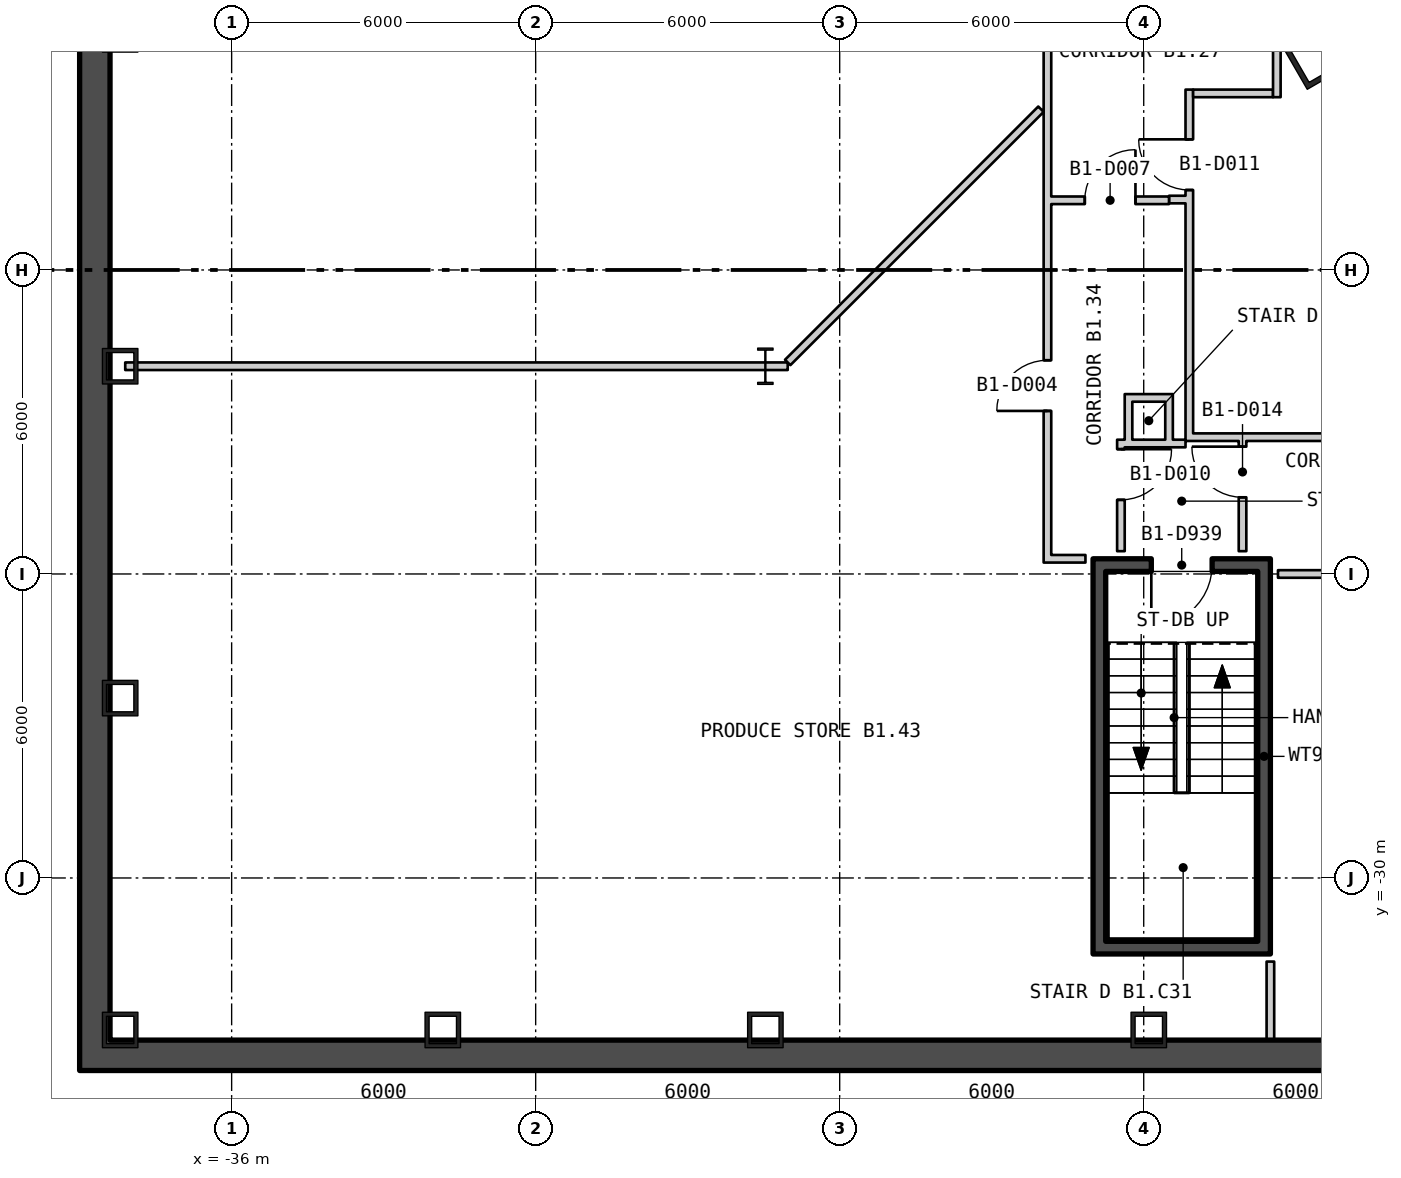
"""IFC4 building model, lengths in metres.
Left out: names, types, materials, properties, quantities, classifications, styles, units other than length and angle.
Written with IfcOpenShell. Run it as: python <this file> out.ifc"""

import sys

from ifc_helpers import new_model, si_unit, direction, frame, frame_2d, origin, origin_2d, place, context, subcontext, project, spatial, rectangle, hollow_rectangle, i_section, extrude, element, fill, save


model = new_model("IFC4")
c1 = context("Model", 3, precision=1e-05, world=origin(), true_north=direction((0.0, 1.0)))
c2 = subcontext(c1, "Body", "Model", "MODEL_VIEW")
j1 = project(units=[si_unit("LENGTHUNIT", "METRE"), si_unit("PLANEANGLEUNIT", "RADIAN")], contexts=[c1])
p1 = place(None, origin())
s1 = spatial("IfcSite", under=j1, at=p1, CompositionType="ELEMENT")
p2 = place(p1, origin())
s2 = spatial("IfcBuilding", under=s1, at=p2, CompositionType="ELEMENT")
p3 = place(p2, frame((0.0, 0.0, -5.7)))
s3 = spatial("IfcBuildingStorey", under=s2, at=p3, CompositionType="ELEMENT", Elevation=-5.7)
p4 = place(p3, frame((-14.553, -13.615, 0.0), z_axis=(0.0, 0.0, 1.0), x_axis=(0.5, -0.866025403784, 0.0)))
e1 = element("IfcColumn", 1, at=p4, inside=s3, PredefinedType="COLUMN", context=c2, shape_type="SweptSolid", body=[
    extrude(hollow_rectangle(XDim=1.2, YDim=1.2, WallThickness=0.1, at=origin_2d()), origin(), (0.0, 0.0, 1.0), 5.7),
])
for number, where, z_axis, x_axis in (
    (2, (-38.2, -19.9, 0.0), (0.0, 0.0, 1.0), (0.0, -1.0, 0.0)),
    (3, (-38.2, -26.45, 0.0), (0.0, 0.0, 1.0), (0.0, -1.0, 0.0)),
    (4, (-38.2, -33.0, 0.0), (0.0, 0.0, 1.0), (1.0, 0.0, 0.0)),
    (5, (-31.833, -33.0, 0.0), (0.0, 0.0, 1.0), (1.0, 0.0, 0.0)),
    (6, (-25.467, -33.0, 0.0), (0.0, 0.0, 1.0), (1.0, 0.0, 0.0)),
    (7, (-17.9, -33.0, 0.0), (0.0, 0.0, 1.0), (1.0, 0.0, 0.0)),
):
    element("IfcColumn", number, at=place(p3, frame(where, z_axis=z_axis, x_axis=x_axis)), inside=s3, PredefinedType="COLUMN", context=c2, shape_type="SweptSolid", body=[
        extrude(hollow_rectangle(XDim=0.7, YDim=0.7, WallThickness=0.08, at=origin_2d()), origin(), (0.0, 0.0, 1.0), 5.7),
    ])
p5 = place(p3, frame((-25.467, -19.9, 0.0), z_axis=(0.0, 0.0, 1.0), x_axis=(1.0, 0.0, 0.0)))
e8 = element("IfcColumn", 8, at=p5, inside=s3, PredefinedType="COLUMN", context=c2, shape_type="SweptSolid", body=[
    extrude(i_section(OverallWidth=0.304, OverallDepth=0.716, WebThickness=0.021, FlangeThickness=0.04, at=origin_2d()), origin(), (0.0, 0.0, 1.0), 5.7),
])
p6 = place(p3, frame((-39.0, -33.5, -0.4), z_axis=(0.0, 0.0, 1.0), x_axis=(1.0, 0.0, 0.0)))
e9 = element("IfcWall", 9, at=p6, inside=s3, PredefinedType="STANDARD", context=c2, shape_type="SweptSolid", body=[
    extrude(rectangle(XDim=78.0, YDim=0.6, at=frame_2d((39.0, 0.0))), origin(), (0.0, 0.0, 1.0), 5.7),
])
p7 = place(p3, frame((-38.7, -33.2, -0.4), z_axis=(0.0, 0.0, 1.0), x_axis=(0.0, 1.0, 0.0)))
e10 = element("IfcWall", 10, at=p7, inside=s3, PredefinedType="STANDARD", context=c2, shape_type="SweptSolid", body=[
    extrude(rectangle(XDim=52.8, YDim=0.6, at=frame_2d((26.4, 0.0))), origin(), (0.0, 0.0, 1.0), 5.7),
])
for number, where, z_axis, x_axis in (
    (11, (-18.875, -31.25, 0.0), (0.0, 0.0, 1.0), (0.0, 1.0, 0.0)),
    (12, (-15.625, -31.25, 0.0), (0.0, 0.0, 1.0), (0.0, 1.0, 0.0)),
):
    element("IfcWall", number, at=place(p3, frame(where, z_axis=z_axis, x_axis=x_axis)), inside=s3, PredefinedType="SHEAR", context=c2, shape_type="SweptSolid", body=[
        extrude(rectangle(XDim=7.3, YDim=0.25, at=frame_2d((3.65, 0.0))), origin(), (0.0, 0.0, 1.0), 5.25),
    ])
p8 = place(p3, frame((-19.0, -31.375, 0.0), z_axis=(0.0, 0.0, 1.0), x_axis=(1.0, 0.0, 0.0)))
e13 = element("IfcWall", 13, at=p8, inside=s3, PredefinedType="SHEAR", context=c2, shape_type="SweptSolid", body=[
    extrude(rectangle(XDim=3.5, YDim=0.25, at=frame_2d((1.75, 0.0))), origin(), (0.0, 0.0, 1.0), 5.25),
])
p9 = place(p3, frame((-19.0, -23.825, 0.0), z_axis=(0.0, 0.0, 1.0), x_axis=(1.0, 0.0, 0.0)))
e14 = element("IfcWall", 14, at=p9, inside=s3, PredefinedType="SHEAR", context=c2, shape_type="SweptSolid", body=[
    extrude(rectangle(XDim=3.5, YDim=0.25, at=frame_2d((1.75, 0.0))), origin(), (0.0, 0.0, 1.0), 5.25),
])
p10 = place(p9, frame((1.15, 0.0, 0.0)))
e15 = element("IfcOpeningElement", 15, at=p10, cuts=e14, PredefinedType="OPENING", context=c2, shape_type="SweptSolid", body=[
    extrude(rectangle(XDim=1.2, YDim=2.1, at=frame_2d((0.6, 1.05))), frame((0.0, 0.135, 0.0), z_axis=(0.0, -1.0, 0.0), x_axis=(1.0, 0.0, 0.0)), (0.0, 0.0, 1.0), 0.27),
])
p11 = place(p3, frame((-38.1, -19.9, 0.0), z_axis=(0.0, 0.0, 1.0), x_axis=(1.0, 0.0, 0.0)))
e16 = element("IfcWall", 16, at=p11, inside=s3, PredefinedType="PARTITIONING", context=c2, shape_type="SweptSolid", body=[
    extrude(rectangle(XDim=13.074, YDim=0.15, at=frame_2d((6.537, 0.0))), origin(), (0.0, 0.0, 1.0), 5.25),
])
p12 = place(p3, frame((-25.026, -19.825, 0.0), z_axis=(0.0, 0.0, 1.0), x_axis=(0.707106781187, 0.707106781187, 0.0)))
e17 = element("IfcWall", 17, at=p12, inside=s3, PredefinedType="PARTITIONING", context=c2, shape_type="SweptSolid", body=[
    extrude(rectangle(XDim=7.068, YDim=0.15, at=frame_2d((3.534, 0.0))), origin(), (0.0, 0.0, 1.0), 5.25),
])
p13 = place(p3, frame((-19.9, -23.775, 0.0), z_axis=(0.0, 0.0, 1.0), x_axis=(0.0, 1.0, 0.0)))
e18 = element("IfcWall", 18, at=p13, inside=s3, PredefinedType="PARTITIONING", context=c2, shape_type="SweptSolid", body=[
    extrude(rectangle(XDim=16.875, YDim=0.15, at=frame_2d((8.438, 0.0))), origin(), (0.0, 0.0, 1.0), 5.25),
])
p14 = place(p13, frame((2.993, 0.0, 0.0)))
e19 = element("IfcOpeningElement", 19, at=p14, cuts=e18, PredefinedType="OPENING", context=c2, shape_type="SweptSolid", body=[
    extrude(rectangle(XDim=1.0, YDim=2.1, at=frame_2d((0.5, 1.05))), frame((0.0, 0.085, 0.0), z_axis=(0.0, -1.0, 0.0), x_axis=(1.0, 0.0, 0.0)), (0.0, 0.0, 1.0), 0.17),
])
p15 = place(p13, frame((12.35, 0.0, 0.0)))
e20 = element("IfcOpeningElement", 20, at=p15, cuts=e18, PredefinedType="OPENING", context=c2, shape_type="SweptSolid", body=[
    extrude(rectangle(XDim=1.0, YDim=2.1, at=frame_2d((0.5, 1.05))), frame((0.0, 0.085, 0.0), z_axis=(0.0, -1.0, 0.0), x_axis=(1.0, 0.0, 0.0)), (0.0, 0.0, 1.0), 0.17),
])
p16 = place(p3, frame((-19.825, -23.7, 0.0), z_axis=(0.0, 0.0, 1.0), x_axis=(1.0, 0.0, 0.0)))
e21 = element("IfcWall", 21, at=p16, inside=s3, PredefinedType="PARTITIONING", context=c2, shape_type="SweptSolid", body=[
    extrude(rectangle(XDim=0.675, YDim=0.15, at=frame_2d((0.338, 0.0))), origin(), (0.0, 0.0, 1.0), 5.25),
])
p17 = place(p3, frame((-19.825, -16.625, 0.0), z_axis=(0.0, 0.0, 1.0), x_axis=(1.0, 0.0, 0.0)))
e22 = element("IfcWall", 22, at=p17, inside=s3, PredefinedType="PARTITIONING", context=c2, shape_type="SweptSolid", body=[
    extrude(rectangle(XDim=2.324, YDim=0.15, at=frame_2d((1.162, 0.0))), origin(), (0.0, 0.0, 1.0), 5.25),
])
p18 = place(p17, frame((0.662, 0.0, 0.0)))
e23 = element("IfcOpeningElement", 23, at=p18, cuts=e22, PredefinedType="OPENING", context=c2, shape_type="SweptSolid", body=[
    extrude(rectangle(XDim=1.0, YDim=2.1, at=frame_2d((0.5, 1.05))), frame((0.0, 0.085, 0.0), z_axis=(0.0, -1.0, 0.0), x_axis=(1.0, 0.0, 0.0)), (0.0, 0.0, 1.0), 0.17),
])
p19 = place(p3, frame((-18.45, -23.55, 0.0), z_axis=(0.0, 0.0, 1.0), x_axis=(0.0, 1.0, 0.0)))
e24 = element("IfcWall", 24, at=p19, inside=s3, PredefinedType="PARTITIONING", context=c2, shape_type="SweptSolid", body=[
    extrude(rectangle(XDim=2.2, YDim=0.15, at=frame_2d((1.1, 0.0))), origin(), (0.0, 0.0, 1.0), 5.25),
])
p20 = place(p19, frame((1.013, 0.0, 0.0)))
e25 = element("IfcOpeningElement", 25, at=p20, cuts=e24, PredefinedType="OPENING", context=c2, shape_type="SweptSolid", body=[
    extrude(rectangle(XDim=1.0, YDim=2.1, at=frame_2d((0.5, 1.05))), frame((0.0, 0.085, 0.0), z_axis=(0.0, -1.0, 0.0), x_axis=(1.0, 0.0, 0.0)), (0.0, 0.0, 1.0), 0.17),
])
p21 = place(p3, frame((-18.3, -21.5, 0.0), z_axis=(0.0, 0.0, 1.0), x_axis=(0.0, 1.0, 0.0)))
e26 = element("IfcWall", 26, at=p21, inside=s3, PredefinedType="PARTITIONING", context=c2, shape_type="SweptSolid", body=[
    extrude(rectangle(XDim=1.05, YDim=0.15, at=frame_2d((0.525, 0.0))), origin(), (0.0, 0.0, 1.0), 5.25),
])
for number, where, z_axis, x_axis in (
    (27, (-18.225, -21.425, 0.0), (0.0, 0.0, 1.0), (1.0, 0.0, 0.0)),
    (28, (-18.225, -20.525, 0.0), (0.0, 0.0, 1.0), (1.0, 0.0, 0.0)),
):
    element("IfcWall", number, at=place(p3, frame(where, z_axis=z_axis, x_axis=x_axis)), inside=s3, PredefinedType="PARTITIONING", context=c2, shape_type="SweptSolid", body=[
        extrude(rectangle(XDim=0.65, YDim=0.15, at=frame_2d((0.325, 0.0))), origin(), (0.0, 0.0, 1.0), 5.25),
    ])
p22 = place(p3, frame((-17.5, -21.5, 0.0), z_axis=(0.0, 0.0, 1.0), x_axis=(0.0, 1.0, 0.0)))
e29 = element("IfcWall", 29, at=p22, inside=s3, PredefinedType="PARTITIONING", context=c2, shape_type="SweptSolid", body=[
    extrude(rectangle(XDim=1.05, YDim=0.15, at=frame_2d((0.525, 0.0))), origin(), (0.0, 0.0, 1.0), 5.25),
])
p23 = place(p3, frame((-17.5, -16.61, 0.0), z_axis=(0.0, 0.0, 1.0), x_axis=(1.0, 0.0, 0.0)))
e30 = element("IfcWall", 30, at=p23, inside=s3, PredefinedType="PARTITIONING", context=c2, shape_type="SweptSolid", body=[
    extrude(rectangle(XDim=0.325, YDim=0.15, at=frame_2d((0.163, 0.0))), origin(), (0.0, 0.0, 1.0), 5.25),
])
p24 = place(p3, frame((-17.425, -21.425, 0.0), z_axis=(0.0, 0.0, 1.0), x_axis=(1.0, 0.0, 0.0)))
e31 = element("IfcWall", 31, at=p24, inside=s3, PredefinedType="PARTITIONING", context=c2, shape_type="SweptSolid", body=[
    extrude(rectangle(XDim=0.25, YDim=0.15, at=frame_2d((0.125, 0.0))), origin(), (0.0, 0.0, 1.0), 5.25),
])
p25 = place(p3, frame((-17.175, -21.3, 0.0), z_axis=(0.0, 0.0, 1.0), x_axis=(1.0, 0.0, 0.0)))
e32 = element("IfcWall", 32, at=p25, inside=s3, PredefinedType="PARTITIONING", context=c2, shape_type="SweptSolid", body=[
    extrude(rectangle(XDim=10.805, YDim=0.15, at=frame_2d((5.402, 0.0))), origin(), (0.0, 0.0, 1.0), 5.25),
])
p26 = place(p3, frame((-17.1, -21.225, 0.0), z_axis=(0.0, 0.0, 1.0), x_axis=(0.0, 1.0, 0.0)))
e33 = element("IfcWall", 33, at=p26, inside=s3, PredefinedType="PARTITIONING", context=c2, shape_type="SweptSolid", body=[
    extrude(rectangle(XDim=6.785, YDim=0.15, at=frame_2d((3.393, 0.0))), origin(), (0.0, 0.0, 1.0), 5.25),
])
p27 = place(p26, frame((4.803, 0.0, 0.0)))
e34 = element("IfcOpeningElement", 34, at=p27, cuts=e33, PredefinedType="OPENING", context=c2, shape_type="SweptSolid", body=[
    extrude(rectangle(XDim=1.0, YDim=2.1, at=frame_2d((0.5, 1.05))), frame((0.0, 0.085, 0.0), z_axis=(0.0, -1.0, 0.0), x_axis=(1.0, 0.0, 0.0)), (0.0, 0.0, 1.0), 0.17),
])
p28 = place(p3, frame((-17.025, -14.515, 0.0), z_axis=(0.0, 0.0, 1.0), x_axis=(1.0, 0.0, 0.0)))
e35 = element("IfcWall", 35, at=p28, inside=s3, PredefinedType="PARTITIONING", context=c2, shape_type="SweptSolid", body=[
    extrude(rectangle(XDim=1.577, YDim=0.15, at=frame_2d((0.788, 0.0))), origin(), (0.0, 0.0, 1.0), 5.25),
])
p29 = place(p3, frame((-16.05, -23.55, 0.0), z_axis=(0.0, 0.0, 1.0), x_axis=(0.0, 1.0, 0.0)))
e36 = element("IfcWall", 36, at=p29, inside=s3, PredefinedType="PARTITIONING", context=c2, shape_type="SweptSolid", body=[
    extrude(rectangle(XDim=2.175, YDim=0.15, at=frame_2d((1.087, 0.0))), origin(), (0.0, 0.0, 1.0), 5.25),
])
p30 = place(p29, frame((1.063, 0.0, 0.0)))
e37 = element("IfcOpeningElement", 37, at=p30, cuts=e36, PredefinedType="OPENING", context=c2, shape_type="SweptSolid", body=[
    extrude(rectangle(XDim=1.0, YDim=2.1, at=frame_2d((0.5, 1.05))), frame((0.0, 0.085, 0.0), z_axis=(0.0, -1.0, 0.0), x_axis=(1.0, 0.0, 0.0)), (0.0, 0.0, 1.0), 0.17),
])
p31 = place(p3, frame((-15.5, -33.35, 0.0), z_axis=(0.0, 0.0, 1.0), x_axis=(0.0, 1.0, 0.0)))
e38 = element("IfcWall", 38, at=p31, inside=s3, PredefinedType="PARTITIONING", context=c2, shape_type="SweptSolid", body=[
    extrude(rectangle(XDim=1.7, YDim=0.15, at=frame_2d((0.85, 0.0))), origin(), (0.0, 0.0, 1.0), 5.25),
])
p32 = place(p3, frame((-15.373, -14.59, 0.0), z_axis=(0.0, 0.0, 1.0), x_axis=(0.0, 1.0, 0.0)))
e39 = element("IfcWall", 39, at=p32, inside=s3, PredefinedType="PARTITIONING", context=c2, shape_type="SweptSolid", body=[
    extrude(rectangle(XDim=1.95, YDim=0.15, at=frame_2d((0.975, 0.0))), origin(), (0.0, 0.0, 1.0), 5.25),
])
p33 = place(p3, frame((-15.35, -24.0, 0.0), z_axis=(0.0, 0.0, 1.0), x_axis=(1.0, 0.0, 0.0)))
e40 = element("IfcWall", 40, at=p33, inside=s3, PredefinedType="PARTITIONING", context=c2, shape_type="SweptSolid", body=[
    extrude(rectangle(XDim=9.064, YDim=0.15, at=frame_2d((4.532, 0.0))), origin(), (0.0, 0.0, 1.0), 5.25),
])
p34 = place(p10, origin())
e41 = element("IfcDoor", 41, at=p34, inside=s3, OperationType="SINGLE_SWING_LEFT", PredefinedType="DOOR", context=c2, shape_type="SweptSolid", body=[
    extrude(rectangle(XDim=1.2, YDim=2.1, at=frame_2d((0.6, 1.05))), frame((0.0, 0.025, 0.0), z_axis=(0.0, -1.0, 0.0), x_axis=(1.0, 0.0, 0.0)), (0.0, 0.0, 1.0), 0.05),
])
fill(e15, e41)
p35 = place(p14, origin())
e42 = element("IfcDoor", 42, at=p35, inside=s3, OperationType="SINGLE_SWING_RIGHT", PredefinedType="DOOR", context=c2, shape_type="SweptSolid", body=[
    extrude(rectangle(XDim=1.0, YDim=2.1, at=frame_2d((0.5, 1.05))), frame((0.0, 0.025, 0.0), z_axis=(0.0, -1.0, 0.0), x_axis=(1.0, 0.0, 0.0)), (0.0, 0.0, 1.0), 0.05),
])
fill(e19, e42)
p36 = place(p18, origin())
e43 = element("IfcDoor", 43, at=p36, inside=s3, OperationType="SINGLE_SWING_LEFT", PredefinedType="DOOR", context=c2, shape_type="SweptSolid", body=[
    extrude(rectangle(XDim=1.0, YDim=2.1, at=frame_2d((0.5, 1.05))), frame((0.0, 0.025, 0.0), z_axis=(0.0, -1.0, 0.0), x_axis=(1.0, 0.0, 0.0)), (0.0, 0.0, 1.0), 0.05),
])
fill(e23, e43)
p37 = place(p20, origin())
e44 = element("IfcDoor", 44, at=p37, inside=s3, OperationType="SINGLE_SWING_RIGHT", PredefinedType="DOOR", context=c2, shape_type="SweptSolid", body=[
    extrude(rectangle(XDim=1.0, YDim=2.1, at=frame_2d((0.5, 1.05))), frame((0.0, 0.025, 0.0), z_axis=(0.0, -1.0, 0.0), x_axis=(1.0, 0.0, 0.0)), (0.0, 0.0, 1.0), 0.05),
])
fill(e25, e44)
p38 = place(p27, origin())
e45 = element("IfcDoor", 45, at=p38, inside=s3, OperationType="SINGLE_SWING_LEFT", PredefinedType="DOOR", context=c2, shape_type="SweptSolid", body=[
    extrude(rectangle(XDim=1.0, YDim=2.1, at=frame_2d((0.5, 1.05))), frame((0.0, 0.025, 0.0), z_axis=(0.0, -1.0, 0.0), x_axis=(1.0, 0.0, 0.0)), (0.0, 0.0, 1.0), 0.05),
])
fill(e34, e45)
p39 = place(p30, origin())
e46 = element("IfcDoor", 46, at=p39, inside=s3, OperationType="SINGLE_SWING_LEFT", PredefinedType="DOOR", context=c2, shape_type="SweptSolid", body=[
    extrude(rectangle(XDim=1.0, YDim=2.1, at=frame_2d((0.5, 1.05))), frame((0.0, 0.025, 0.0), z_axis=(0.0, -1.0, 0.0), x_axis=(1.0, 0.0, 0.0)), (0.0, 0.0, 1.0), 0.05),
])
fill(e37, e46)
save(model, sys.argv[1])
